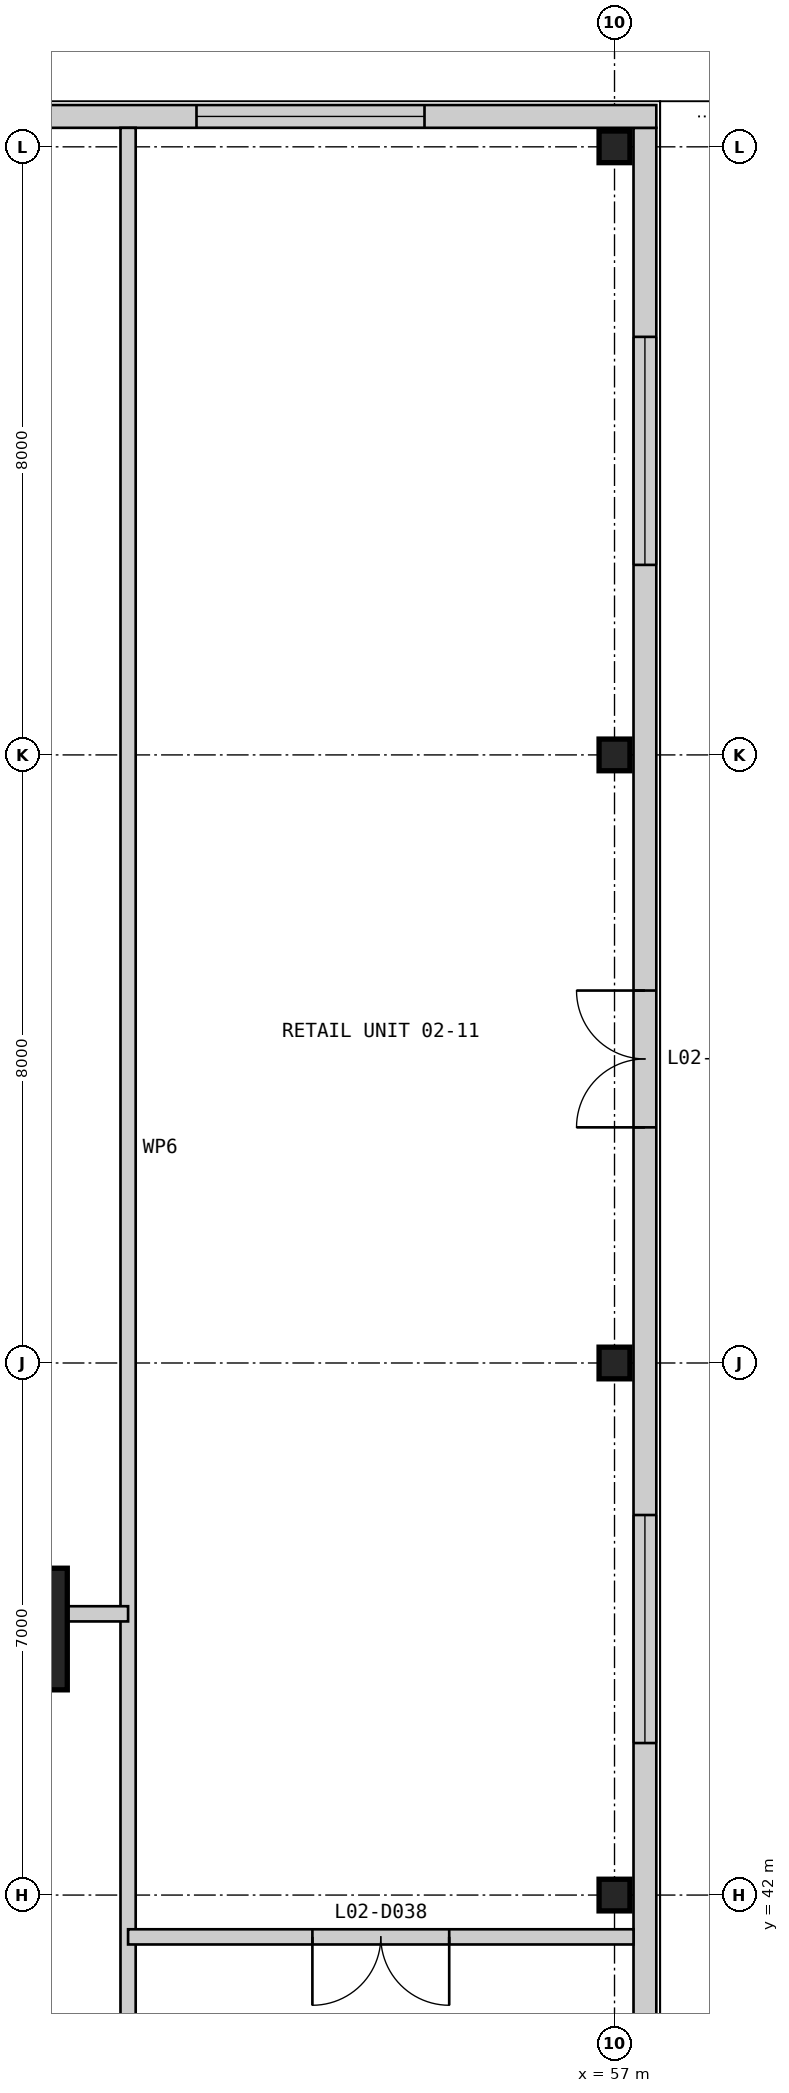
"""IFC4 building model, lengths in metres.
Left out: names, types, materials, properties, quantities, classifications, styles, units other than length and angle.
Written with IfcOpenShell. Run it as: python <this file> out.ifc"""

import sys

from ifc_helpers import new_model, si_unit, direction, frame, frame_2d, origin, origin_2d, place, context, subcontext, project, spatial, rectangle, i_section, extrude, element, fill, save


model = new_model("IFC4")
c1 = context("Model", 3, precision=1e-05, world=origin(), true_north=direction((0.0, 1.0)))
c2 = subcontext(c1, "Body", "Model", "MODEL_VIEW")
j1 = project(units=[si_unit("LENGTHUNIT", "METRE"), si_unit("PLANEANGLEUNIT", "RADIAN")], contexts=[c1])
p1 = place(None, origin())
s1 = spatial("IfcSite", under=j1, at=p1, CompositionType="ELEMENT")
p2 = place(p1, origin())
s2 = spatial("IfcBuilding", under=s1, at=p2, CompositionType="ELEMENT")
p3 = place(p2, frame((0.0, 0.0, 11.8)))
s3 = spatial("IfcBuildingStorey", under=s2, at=p3, CompositionType="ELEMENT", Elevation=11.8)
p4 = place(p3, frame((49.0, 45.5, 0.0), z_axis=(0.0, 0.0, 1.0), x_axis=(1.0, 0.0, 0.0)))
e1 = element("IfcColumn", 1, at=p4, inside=s3, PredefinedType="COLUMN", context=c2, shape_type="SweptSolid", body=[
    extrude(rectangle(XDim=1.6, YDim=1.6, at=origin_2d()), origin(), (0.0, 0.0, 1.0), 4.8),
])
for number, where, z_axis, x_axis in (
    (2, (57.0, 42.0, 0.0), (0.0, 0.0, 1.0), (1.0, 0.0, 0.0)),
    (3, (57.0, 49.0, 0.0), (0.0, 0.0, 1.0), (1.0, 0.0, 0.0)),
    (4, (57.0, 57.0, 0.0), (0.0, 0.0, 1.0), (1.0, 0.0, 0.0)),
    (5, (57.0, 65.0, 0.0), (0.0, 0.0, 1.0), (1.0, 0.0, 0.0)),
):
    element("IfcColumn", number, at=place(p3, frame(where, z_axis=z_axis, x_axis=x_axis)), inside=s3, PredefinedType="COLUMN", context=c2, shape_type="SweptSolid", body=[
        extrude(i_section(OverallWidth=0.406, OverallDepth=0.417, WebThickness=0.03, FlangeThickness=0.048, at=origin_2d()), origin(), (0.0, 0.0, 1.0), 4.8),
    ])
p5 = place(p3, frame((57.4, -7.25, 0.0), z_axis=(0.0, 0.0, 1.0), x_axis=(0.0, 1.0, 0.0)))
e6 = element("IfcWall", 6, at=p5, inside=s3, PredefinedType="SOLIDWALL", context=c2, shape_type="SweptSolid", body=[
    extrude(rectangle(XDim=72.5, YDim=0.3, at=frame_2d((36.25, 0.0))), origin(), (0.0, 0.0, 1.0), 4.5),
])
p6 = place(p5, frame((25.35, 0.0, 0.0)))
e7 = element("IfcOpeningElement", 7, at=p6, cuts=e6, PredefinedType="OPENING", context=c2, shape_type="SweptSolid", body=[
    extrude(rectangle(XDim=1.8, YDim=2.4, at=frame_2d((0.9, 1.2))), frame((0.0, 0.16, 0.0), z_axis=(0.0, -1.0, 0.0), x_axis=(1.0, 0.0, 0.0)), (0.0, 0.0, 1.0), 0.32),
])
p7 = place(p5, frame((45.85, 0.0, 0.0)))
e8 = element("IfcOpeningElement", 8, at=p7, cuts=e6, PredefinedType="OPENING", context=c2, shape_type="SweptSolid", body=[
    extrude(rectangle(XDim=1.8, YDim=2.4, at=frame_2d((0.9, 1.2))), frame((0.0, 0.16, 0.0), z_axis=(0.0, -1.0, 0.0), x_axis=(1.0, 0.0, 0.0)), (0.0, 0.0, 1.0), 0.32),
])
p8 = place(p5, frame((59.35, 0.0, 0.0)))
e9 = element("IfcOpeningElement", 9, at=p8, cuts=e6, PredefinedType="OPENING", context=c2, shape_type="SweptSolid", body=[
    extrude(rectangle(XDim=1.8, YDim=2.4, at=frame_2d((0.9, 1.2))), frame((0.0, 0.16, 0.0), z_axis=(0.0, -1.0, 0.0), x_axis=(1.0, 0.0, 0.0)), (0.0, 0.0, 1.0), 0.32),
])
p9 = place(p5, frame((2.75, 0.0, 0.9)))
e10 = element("IfcOpeningElement", 10, at=p9, cuts=e6, PredefinedType="OPENING", context=c2, shape_type="SweptSolid", body=[
    extrude(rectangle(XDim=3.0, YDim=2.4, at=frame_2d((1.5, 1.2))), frame((0.0, 0.16, 0.0), z_axis=(0.0, -1.0, 0.0), x_axis=(1.0, 0.0, 0.0)), (0.0, 0.0, 1.0), 0.32),
])
p10 = place(p5, frame((10.75, 0.0, 0.9)))
e11 = element("IfcOpeningElement", 11, at=p10, cuts=e6, PredefinedType="OPENING", context=c2, shape_type="SweptSolid", body=[
    extrude(rectangle(XDim=3.0, YDim=2.4, at=frame_2d((1.5, 1.2))), frame((0.0, 0.16, 0.0), z_axis=(0.0, -1.0, 0.0), x_axis=(1.0, 0.0, 0.0)), (0.0, 0.0, 1.0), 0.32),
])
p11 = place(p5, frame((36.75, 0.0, 0.9)))
e12 = element("IfcOpeningElement", 12, at=p11, cuts=e6, PredefinedType="OPENING", context=c2, shape_type="SweptSolid", body=[
    extrude(rectangle(XDim=3.0, YDim=2.4, at=frame_2d((1.5, 1.2))), frame((0.0, 0.16, 0.0), z_axis=(0.0, -1.0, 0.0), x_axis=(1.0, 0.0, 0.0)), (0.0, 0.0, 1.0), 0.32),
])
p12 = place(p5, frame((51.25, 0.0, 0.9)))
e13 = element("IfcOpeningElement", 13, at=p12, cuts=e6, PredefinedType="OPENING", context=c2, shape_type="SweptSolid", body=[
    extrude(rectangle(XDim=3.0, YDim=2.4, at=frame_2d((1.5, 1.2))), frame((0.0, 0.16, 0.0), z_axis=(0.0, -1.0, 0.0), x_axis=(1.0, 0.0, 0.0)), (0.0, 0.0, 1.0), 0.32),
])
p13 = place(p5, frame((66.75, 0.0, 0.9)))
e14 = element("IfcOpeningElement", 14, at=p13, cuts=e6, PredefinedType="OPENING", context=c2, shape_type="SweptSolid", body=[
    extrude(rectangle(XDim=3.0, YDim=2.4, at=frame_2d((1.5, 1.2))), frame((0.0, 0.16, 0.0), z_axis=(0.0, -1.0, 0.0), x_axis=(1.0, 0.0, 0.0)), (0.0, 0.0, 1.0), 0.32),
])
p14 = place(p3, frame((57.55, 65.4, 0.0), z_axis=(0.0, 0.0, 1.0), x_axis=(-1.0, 0.0, 0.0)))
e15 = element("IfcWall", 15, at=p14, inside=s3, PredefinedType="SOLIDWALL", context=c2, shape_type="SweptSolid", body=[
    extrude(rectangle(XDim=73.1, YDim=0.3, at=frame_2d((36.55, 0.0))), origin(), (0.0, 0.0, 1.0), 4.5),
])
p15 = place(p14, frame((67.05, 0.0, 0.9)))
e16 = element("IfcOpeningElement", 16, at=p15, cuts=e15, PredefinedType="OPENING", context=c2, shape_type="SweptSolid", body=[
    extrude(rectangle(XDim=3.0, YDim=2.4, at=frame_2d((1.5, 1.2))), frame((0.0, 0.16, 0.0), z_axis=(0.0, -1.0, 0.0), x_axis=(1.0, 0.0, 0.0)), (0.0, 0.0, 1.0), 0.32),
])
p16 = place(p14, frame((59.05, 0.0, 0.9)))
e17 = element("IfcOpeningElement", 17, at=p16, cuts=e15, PredefinedType="OPENING", context=c2, shape_type="SweptSolid", body=[
    extrude(rectangle(XDim=3.0, YDim=2.4, at=frame_2d((1.5, 1.2))), frame((0.0, 0.16, 0.0), z_axis=(0.0, -1.0, 0.0), x_axis=(1.0, 0.0, 0.0)), (0.0, 0.0, 1.0), 0.32),
])
p17 = place(p14, frame((51.05, 0.0, 0.9)))
e18 = element("IfcOpeningElement", 18, at=p17, cuts=e15, PredefinedType="OPENING", context=c2, shape_type="SweptSolid", body=[
    extrude(rectangle(XDim=3.0, YDim=2.4, at=frame_2d((1.5, 1.2))), frame((0.0, 0.16, 0.0), z_axis=(0.0, -1.0, 0.0), x_axis=(1.0, 0.0, 0.0)), (0.0, 0.0, 1.0), 0.32),
])
p18 = place(p14, frame((37.05, 0.0, 0.9)))
e19 = element("IfcOpeningElement", 19, at=p18, cuts=e15, PredefinedType="OPENING", context=c2, shape_type="SweptSolid", body=[
    extrude(rectangle(XDim=3.0, YDim=2.4, at=frame_2d((1.5, 1.2))), frame((0.0, 0.16, 0.0), z_axis=(0.0, -1.0, 0.0), x_axis=(1.0, 0.0, 0.0)), (0.0, 0.0, 1.0), 0.32),
])
p19 = place(p14, frame((25.05, 0.0, 0.9)))
e20 = element("IfcOpeningElement", 20, at=p19, cuts=e15, PredefinedType="OPENING", context=c2, shape_type="SweptSolid", body=[
    extrude(rectangle(XDim=3.0, YDim=2.4, at=frame_2d((1.5, 1.2))), frame((0.0, 0.16, 0.0), z_axis=(0.0, -1.0, 0.0), x_axis=(1.0, 0.0, 0.0)), (0.0, 0.0, 1.0), 0.32),
])
p20 = place(p14, frame((16.55, 0.0, 0.9)))
e21 = element("IfcOpeningElement", 21, at=p20, cuts=e15, PredefinedType="OPENING", context=c2, shape_type="SweptSolid", body=[
    extrude(rectangle(XDim=3.0, YDim=2.4, at=frame_2d((1.5, 1.2))), frame((0.0, 0.16, 0.0), z_axis=(0.0, -1.0, 0.0), x_axis=(1.0, 0.0, 0.0)), (0.0, 0.0, 1.0), 0.32),
])
p21 = place(p14, frame((10.55, 0.0, 0.9)))
e22 = element("IfcOpeningElement", 22, at=p21, cuts=e15, PredefinedType="OPENING", context=c2, shape_type="SweptSolid", body=[
    extrude(rectangle(XDim=3.0, YDim=2.4, at=frame_2d((1.5, 1.2))), frame((0.0, 0.16, 0.0), z_axis=(0.0, -1.0, 0.0), x_axis=(1.0, 0.0, 0.0)), (0.0, 0.0, 1.0), 0.32),
])
p22 = place(p14, frame((3.05, 0.0, 0.9)))
e23 = element("IfcOpeningElement", 23, at=p22, cuts=e15, PredefinedType="OPENING", context=c2, shape_type="SweptSolid", body=[
    extrude(rectangle(XDim=3.0, YDim=2.4, at=frame_2d((1.5, 1.2))), frame((0.0, 0.16, 0.0), z_axis=(0.0, -1.0, 0.0), x_axis=(1.0, 0.0, 0.0)), (0.0, 0.0, 1.0), 0.32),
])
p23 = place(p3, frame((50.6, 38.4, 0.0), z_axis=(0.0, 0.0, 1.0), x_axis=(0.0, 1.0, 0.0)))
e24 = element("IfcWall", 24, at=p23, inside=s3, PredefinedType="PARTITIONING", context=c2, shape_type="SweptSolid", body=[
    extrude(rectangle(XDim=26.85, YDim=0.2, at=frame_2d((13.425, 0.0))), origin(), (0.0, 0.0, 1.0), 4.5),
])
p24 = place(p3, frame((50.6, 41.45, 0.0), z_axis=(0.0, 0.0, 1.0), x_axis=(1.0, 0.0, 0.0)))
e25 = element("IfcWall", 25, at=p24, inside=s3, PredefinedType="PARTITIONING", context=c2, shape_type="SweptSolid", body=[
    extrude(rectangle(XDim=6.65, YDim=0.2, at=frame_2d((3.325, 0.0))), origin(), (0.0, 0.0, 1.0), 4.5),
])
p25 = place(p24, frame((2.425, 0.0, 0.0)))
e26 = element("IfcOpeningElement", 26, at=p25, cuts=e25, PredefinedType="OPENING", context=c2, shape_type="SweptSolid", body=[
    extrude(rectangle(XDim=1.8, YDim=2.4, at=frame_2d((0.9, 1.2))), frame((0.0, 0.11, 0.0), z_axis=(0.0, -1.0, 0.0), x_axis=(1.0, 0.0, 0.0)), (0.0, 0.0, 1.0), 0.22),
])
p26 = place(p3, frame((49.8, 45.7, 0.0), z_axis=(0.0, 0.0, 1.0), x_axis=(1.0, 0.0, 0.0)))
e27 = element("IfcWall", 27, at=p26, inside=s3, PredefinedType="PARTITIONING", context=c2, shape_type="SweptSolid", body=[
    extrude(rectangle(XDim=0.8, YDim=0.2, at=frame_2d((0.4, 0.0))), origin(), (0.0, 0.0, 1.0), 4.5),
])
p27 = place(p8, origin())
e28 = element("IfcDoor", 28, at=p27, inside=s3, OperationType="DOUBLE_DOOR_SINGLE_SWING", PredefinedType="DOOR", context=c2, shape_type="SweptSolid", body=[
    extrude(rectangle(XDim=1.8, YDim=2.4, at=frame_2d((0.9, 1.2))), frame((0.0, 0.025, 0.0), z_axis=(0.0, -1.0, 0.0), x_axis=(1.0, 0.0, 0.0)), (0.0, 0.0, 1.0), 0.05),
])
fill(e9, e28)
p28 = place(p12, origin())
e29 = element("IfcWindow", 29, at=p28, inside=s3, PartitioningType="SINGLE_PANEL", PredefinedType="WINDOW", context=c2, shape_type="SweptSolid", body=[
    extrude(rectangle(XDim=3.0, YDim=2.4, at=frame_2d((1.5, 1.2))), frame((0.0, 0.03, 0.0), z_axis=(0.0, -1.0, 0.0), x_axis=(1.0, 0.0, 0.0)), (0.0, 0.0, 1.0), 0.06),
])
fill(e13, e29)
p29 = place(p13, origin())
e30 = element("IfcWindow", 30, at=p29, inside=s3, PartitioningType="SINGLE_PANEL", PredefinedType="WINDOW", context=c2, shape_type="SweptSolid", body=[
    extrude(rectangle(XDim=3.0, YDim=2.4, at=frame_2d((1.5, 1.2))), frame((0.0, 0.03, 0.0), z_axis=(0.0, -1.0, 0.0), x_axis=(1.0, 0.0, 0.0)), (0.0, 0.0, 1.0), 0.06),
])
fill(e14, e30)
p30 = place(p22, origin())
e31 = element("IfcWindow", 31, at=p30, inside=s3, PartitioningType="SINGLE_PANEL", PredefinedType="WINDOW", context=c2, shape_type="SweptSolid", body=[
    extrude(rectangle(XDim=3.0, YDim=2.4, at=frame_2d((1.5, 1.2))), frame((0.0, 0.03, 0.0), z_axis=(0.0, -1.0, 0.0), x_axis=(1.0, 0.0, 0.0)), (0.0, 0.0, 1.0), 0.06),
])
fill(e23, e31)
p31 = place(p25, frame((1.8, 0.0, 0.0), z_axis=(0.0, 0.0, 1.0), x_axis=(-1.0, 0.0, 0.0)))
e32 = element("IfcDoor", 32, at=p31, inside=s3, OperationType="DOUBLE_DOOR_SINGLE_SWING", PredefinedType="DOOR", context=c2, shape_type="SweptSolid", body=[
    extrude(rectangle(XDim=1.8, YDim=2.4, at=frame_2d((0.9, 1.2))), frame((0.0, 0.025, 0.0), z_axis=(0.0, -1.0, 0.0), x_axis=(1.0, 0.0, 0.0)), (0.0, 0.0, 1.0), 0.05),
])
fill(e26, e32)
save(model, sys.argv[1])
